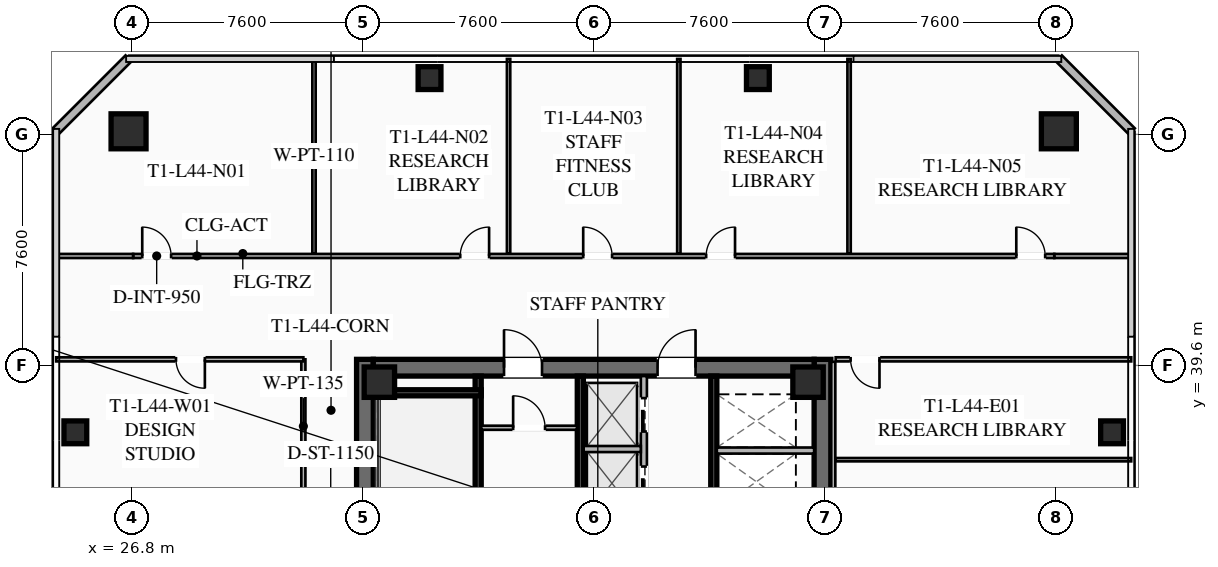
"""IFC4 building model, lengths in metres.
Left out: names, types, materials, properties, quantities, classifications, styles, units other than length and angle.
Written with IfcOpenShell. Run it as: python <this file> out.ifc"""

import sys

from ifc_helpers import new_model, si_unit, direction, frame, frame_2d, origin, origin_2d, place, context, subcontext, project, spatial, rectangle, hollow_rectangle, extrude, element, fill, save


model = new_model("IFC4")
c1 = context("Model", 3, precision=1e-05, world=origin(), true_north=direction((0.0, 1.0)))
c2 = subcontext(c1, "Body", "Model", "MODEL_VIEW")
j1 = project(units=[si_unit("LENGTHUNIT", "METRE"), si_unit("PLANEANGLEUNIT", "RADIAN")], contexts=[c1])
p1 = place(None, origin())
s1 = spatial("IfcSite", under=j1, at=p1, CompositionType="ELEMENT")
p2 = place(p1, origin())
s2 = spatial("IfcBuilding", under=s1, at=p2, CompositionType="ELEMENT")
p3 = place(p2, frame((0.0, 0.0, 164.1)))
s3 = spatial("IfcBuildingStorey", under=s2, at=p3, CompositionType="ELEMENT", Elevation=164.1)
for number, where, z_axis, x_axis in (
    (1, (34.475, 24.2, 0.0), (0.0, 0.0, 1.0), (0.0, 1.0, 0.0)),
    (2, (49.525, 39.8, 0.0), (0.0, 0.0, 1.0), (0.0, -1.0, 0.0)),
):
    element("IfcWall", number, at=place(p3, frame(where, z_axis=z_axis, x_axis=x_axis)), inside=s3, PredefinedType="SHEAR", context=c2, shape_type="SweptSolid", body=[
        extrude(rectangle(XDim=15.6, YDim=0.55, at=frame_2d((7.8, 0.0))), origin(), (0.0, 0.0, 1.0), 3.55),
    ])
p4 = place(p3, frame((34.75, 39.525, 0.0), z_axis=(0.0, 0.0, 1.0), x_axis=(1.0, 0.0, 0.0)))
e3 = element("IfcWall", 3, at=p4, inside=s3, PredefinedType="SHEAR", context=c2, shape_type="SweptSolid", body=[
    extrude(rectangle(XDim=14.5, YDim=0.55, at=frame_2d((7.25, 0.0))), origin(), (0.0, 0.0, 1.0), 3.55),
])
p5 = place(p4, frame((4.3, 0.0, 0.0)))
e4 = element("IfcOpeningElement", 4, at=p5, cuts=e3, PredefinedType="OPENING", context=c2, shape_type="SweptSolid", body=[
    extrude(rectangle(XDim=1.25, YDim=2.25, at=frame_2d((0.625, 1.125))), frame((0.0, 0.285, 0.0), z_axis=(0.0, -1.0, 0.0), x_axis=(1.0, 0.0, 0.0)), (0.0, 0.0, 1.0), 0.57),
])
p6 = place(p4, frame((9.35, 0.0, 0.0)))
e5 = element("IfcOpeningElement", 5, at=p6, cuts=e3, PredefinedType="OPENING", context=c2, shape_type="SweptSolid", body=[
    extrude(rectangle(XDim=1.25, YDim=2.25, at=frame_2d((0.625, 1.125))), frame((0.0, 0.285, 0.0), z_axis=(0.0, -1.0, 0.0), x_axis=(1.0, 0.0, 0.0)), (0.0, 0.0, 1.0), 0.57),
])
for number, where, z_axis, x_axis in (
    (6, (49.05, 39.05, 0.0), (0.0, 0.0, 1.0), (1.0, 0.0, 0.0)),
    (7, (34.95, 39.05, 0.0), (0.0, 0.0, 1.0), (1.0, 0.0, 0.0)),
):
    element("IfcColumn", number, at=place(p3, frame(where, z_axis=z_axis, x_axis=x_axis)), inside=s3, PredefinedType="COLUMN", context=c2, shape_type="SweptSolid", body=[
        extrude(hollow_rectangle(XDim=1.0, YDim=1.0, WallThickness=0.04, at=origin_2d()), origin(), (0.0, 0.0, 1.0), 3.37),
    ])
for number, where, z_axis, x_axis in (
    (8, (57.3, 47.3, 0.0), (0.0, 0.0, 1.0), (1.0, 0.0, 0.0)),
    (9, (26.7, 47.3, 0.0), (0.0, 0.0, 1.0), (1.0, 0.0, 0.0)),
):
    element("IfcColumn", number, at=place(p3, frame(where, z_axis=z_axis, x_axis=x_axis)), inside=s3, PredefinedType="COLUMN", context=c2, shape_type="SweptSolid", body=[
        extrude(hollow_rectangle(XDim=1.15, YDim=1.15, WallThickness=0.045, at=origin_2d()), origin(), (0.0, 0.0, 1.0), 3.37),
    ])
for number, where, z_axis, x_axis in (
    (10, (59.05, 37.4, 0.0), (0.0, 0.0, 1.0), (1.0, 0.0, 0.0)),
    (11, (47.4, 49.05, 0.0), (0.0, 0.0, 1.0), (1.0, 0.0, 0.0)),
    (12, (36.6, 49.05, 0.0), (0.0, 0.0, 1.0), (1.0, 0.0, 0.0)),
    (13, (24.95, 37.4, 0.0), (0.0, 0.0, 1.0), (1.0, 0.0, 0.0)),
):
    element("IfcColumn", number, at=place(p3, frame(where, z_axis=z_axis, x_axis=x_axis)), inside=s3, PredefinedType="COLUMN", context=c2, shape_type="SweptSolid", body=[
        extrude(hollow_rectangle(XDim=0.75, YDim=0.75, WallThickness=0.032, at=origin_2d()), origin(), (0.0, 0.0, 1.0), 3.37),
    ])
for number, where, z_axis, x_axis in (
    (14, (24.3, 47.3, 0.0), (0.0, 0.0, 1.0), (0.707, 0.707, 0.0)),
    (15, (57.3, 49.7, 0.0), (0.0, 0.0, 1.0), (0.707, -0.707, 0.0)),
):
    element("IfcWall", number, at=place(p3, frame(where, z_axis=z_axis, x_axis=x_axis)), inside=s3, PredefinedType="SOLIDWALL", context=c2, shape_type="SweptSolid", body=[
        extrude(rectangle(XDim=3.394, YDim=0.28, at=frame_2d((1.697, 0.0))), origin(), (0.0, 0.0, 1.0), 3.37),
    ])
p7 = place(p3, frame((38.2, 31.2, 0.0), z_axis=(0.0, 0.0, 1.0), x_axis=(0.0, 1.0, 0.0)))
e16 = element("IfcWall", 16, at=p7, inside=s3, PredefinedType="SHEAR", context=c2, shape_type="SweptSolid", body=[
    extrude(rectangle(XDim=8.05, YDim=0.2, at=frame_2d((4.025, 0.0))), origin(), (0.0, 0.0, 1.0), 3.37),
])
p8 = place(p7, frame((0.45, 0.0, 0.0)))
e17 = element("IfcOpeningElement", 17, at=p8, cuts=e16, PredefinedType="OPENING", context=c2, shape_type="SweptSolid", body=[
    extrude(rectangle(XDim=1.15, YDim=2.2, at=frame_2d((0.575, 1.1))), frame((0.0, 0.11, 0.0), z_axis=(0.0, -1.0, 0.0), x_axis=(1.0, 0.0, 0.0)), (0.0, 0.0, 1.0), 0.22),
])
p9 = place(p3, frame((34.75, 38.7, 0.0), z_axis=(0.0, 0.0, 1.0), x_axis=(1.0, 0.0, 0.0)))
e18 = element("IfcWall", 18, at=p9, inside=s3, PredefinedType="SHEAR", context=c2, shape_type="SweptSolid", body=[
    extrude(rectangle(XDim=3.55, YDim=0.2, at=frame_2d((1.775, 0.0))), origin(), (0.0, 0.0, 1.0), 3.37),
])
p10 = place(p3, frame((41.56, 24.75, 0.0), z_axis=(0.0, 0.0, 1.0), x_axis=(0.0, 1.0, 0.0)))
e19 = element("IfcWall", 19, at=p10, inside=s3, PredefinedType="SHEAR", context=c2, shape_type="SweptSolid", body=[
    extrude(rectangle(XDim=14.5, YDim=0.2, at=frame_2d((7.25, 0.0))), origin(), (0.0, 0.0, 1.0), 3.37),
])
p11 = place(p3, frame((45.95, 39.25, 0.0), z_axis=(0.0, 0.0, 1.0), x_axis=(0.0, -1.0, 0.0)))
e20 = element("IfcWall", 20, at=p11, inside=s3, PredefinedType="SHEAR", context=c2, shape_type="SweptSolid", body=[
    extrude(rectangle(XDim=6.45, YDim=0.2, at=frame_2d((3.225, 0.0))), origin(), (0.0, 0.0, 1.0), 3.37),
])
p12 = place(p3, frame((46.05, 36.8, 0.0), z_axis=(0.0, 0.0, 1.0), x_axis=(1.0, 0.0, 0.0)))
e21 = element("IfcWall", 21, at=p12, inside=s3, PredefinedType="SOLIDWALL", context=c2, shape_type="SweptSolid", body=[
    extrude(rectangle(XDim=3.2, YDim=0.2, at=frame_2d((1.6, 0.0))), origin(), (0.0, 0.0, 1.0), 3.37),
])
p13 = place(p3, frame((38.3, 37.55, 0.0), z_axis=(0.0, 0.0, 1.0), x_axis=(1.0, 0.0, 0.0)))
e22 = element("IfcWall", 22, at=p13, inside=s3, PredefinedType="PARTITIONING", context=c2, shape_type="SweptSolid", body=[
    extrude(rectangle(XDim=3.15, YDim=0.135, at=frame_2d((1.575, 0.0))), origin(), (0.0, 0.0, 1.0), 2.723),
])
p14 = place(p13, frame((1.05, 0.0, 0.0)))
e23 = element("IfcOpeningElement", 23, at=p14, cuts=e22, PredefinedType="OPENING", context=c2, shape_type="SweptSolid", body=[
    extrude(rectangle(XDim=1.05, YDim=2.2, at=frame_2d((0.525, 1.1))), frame((0.0, 0.077, 0.0), z_axis=(0.0, -1.0, 0.0), x_axis=(1.0, 0.0, 0.0)), (0.0, 0.0, 1.0), 0.155),
])
p15 = place(p3, frame((43.65, 32.35, 0.0), z_axis=(0.0, 0.0, 1.0), x_axis=(0.0, 1.0, 0.0)))
e24 = element("IfcWall", 24, at=p15, inside=s3, PredefinedType="SOLIDWALL", context=c2, shape_type="SweptSolid", body=[
    extrude(rectangle(XDim=6.9, YDim=0.2, at=frame_2d((3.45, 0.0))), origin(), (0.0, 0.0, 1.0), 3.37),
])
p16 = place(p15, frame((0.575, 0.0, 0.0)))
e25 = element("IfcOpeningElement", 25, at=p16, cuts=e24, PredefinedType="OPENING", context=c2, shape_type="SweptSolid", body=[
    extrude(rectangle(XDim=1.1, YDim=2.2, at=frame_2d((0.55, 1.1))), frame((0.0, 0.11, 0.0), z_axis=(0.0, -1.0, 0.0), x_axis=(1.0, 0.0, 0.0)), (0.0, 0.0, 1.0), 0.22),
])
p17 = place(p15, frame((2.825, 0.0, 0.0)))
e26 = element("IfcOpeningElement", 26, at=p17, cuts=e24, PredefinedType="OPENING", context=c2, shape_type="SweptSolid", body=[
    extrude(rectangle(XDim=1.1, YDim=2.2, at=frame_2d((0.55, 1.1))), frame((0.0, 0.11, 0.0), z_axis=(0.0, -1.0, 0.0), x_axis=(1.0, 0.0, 0.0)), (0.0, 0.0, 1.0), 0.22),
])
p18 = place(p15, frame((5.075, 0.0, 0.0)))
e27 = element("IfcOpeningElement", 27, at=p18, cuts=e24, PredefinedType="OPENING", context=c2, shape_type="SweptSolid", body=[
    extrude(rectangle(XDim=1.1, YDim=2.2, at=frame_2d((0.55, 1.1))), frame((0.0, 0.11, 0.0), z_axis=(0.0, -1.0, 0.0), x_axis=(1.0, 0.0, 0.0)), (0.0, 0.0, 1.0), 0.22),
])
p19 = place(p3, frame((41.67, 36.85, 0.0), z_axis=(0.0, 0.0, 1.0), x_axis=(1.0, 0.0, 0.0)))
e28 = element("IfcWall", 28, at=p19, inside=s3, PredefinedType="SOLIDWALL", context=c2, shape_type="SweptSolid", body=[
    extrude(rectangle(XDim=1.88, YDim=0.2, at=frame_2d((0.94, 0.0))), origin(), (0.0, 0.0, 1.0), 3.37),
])
p20 = place(p3, frame((32.45, 35.4, 0.0), z_axis=(0.0, 0.0, 1.0), x_axis=(0.0, 1.0, 0.0)))
e29 = element("IfcWall", 29, at=p20, inside=s3, PredefinedType="PARTITIONING", context=c2, shape_type="SweptSolid", body=[
    extrude(rectangle(XDim=4.4, YDim=0.135, at=frame_2d((2.2, 0.0))), origin(), (0.0, 0.0, 1.0), 2.723),
])
p21 = place(p3, frame((26.85, 43.2, 0.0), z_axis=(0.0, 0.0, 1.0), x_axis=(1.0, 0.0, 0.0)))
e30 = element("IfcWall", 30, at=p21, inside=s3, PredefinedType="PARTITIONING", context=c2, shape_type="SweptSolid", body=[
    extrude(rectangle(XDim=30.3, YDim=0.135, at=frame_2d((15.15, 0.0))), origin(), (0.0, 0.0, 1.0), 2.723),
])
p22 = place(p21, frame((0.3, 0.0, 0.0)))
e31 = element("IfcOpeningElement", 31, at=p22, cuts=e30, PredefinedType="OPENING", context=c2, shape_type="SweptSolid", body=[
    extrude(rectangle(XDim=0.95, YDim=2.05, at=frame_2d((0.475, 1.025))), frame((0.0, 0.077, 0.0), z_axis=(0.0, -1.0, 0.0), x_axis=(1.0, 0.0, 0.0)), (0.0, 0.0, 1.0), 0.155),
])
p23 = place(p21, frame((10.76, 0.0, 0.0)))
e32 = element("IfcOpeningElement", 32, at=p23, cuts=e30, PredefinedType="OPENING", context=c2, shape_type="SweptSolid", body=[
    extrude(rectangle(XDim=0.95, YDim=2.05, at=frame_2d((0.475, 1.025))), frame((0.0, 0.077, 0.0), z_axis=(0.0, -1.0, 0.0), x_axis=(1.0, 0.0, 0.0)), (0.0, 0.0, 1.0), 0.155),
])
p24 = place(p21, frame((14.805, 0.0, 0.0)))
e33 = element("IfcOpeningElement", 33, at=p24, cuts=e30, PredefinedType="OPENING", context=c2, shape_type="SweptSolid", body=[
    extrude(rectangle(XDim=0.95, YDim=2.05, at=frame_2d((0.475, 1.025))), frame((0.0, 0.077, 0.0), z_axis=(0.0, -1.0, 0.0), x_axis=(1.0, 0.0, 0.0)), (0.0, 0.0, 1.0), 0.155),
])
p25 = place(p21, frame((18.849, 0.0, 0.0)))
e34 = element("IfcOpeningElement", 34, at=p25, cuts=e30, PredefinedType="OPENING", context=c2, shape_type="SweptSolid", body=[
    extrude(rectangle(XDim=0.95, YDim=2.05, at=frame_2d((0.475, 1.025))), frame((0.0, 0.077, 0.0), z_axis=(0.0, -1.0, 0.0), x_axis=(1.0, 0.0, 0.0)), (0.0, 0.0, 1.0), 0.155),
])
p26 = place(p21, frame((29.05, 0.0, 0.0)))
e35 = element("IfcOpeningElement", 35, at=p26, cuts=e30, PredefinedType="OPENING", context=c2, shape_type="SweptSolid", body=[
    extrude(rectangle(XDim=0.95, YDim=2.05, at=frame_2d((0.475, 1.025))), frame((0.0, 0.077, 0.0), z_axis=(0.0, -1.0, 0.0), x_axis=(1.0, 0.0, 0.0)), (0.0, 0.0, 1.0), 0.155),
])
for number, where, z_axis, x_axis in (
    (36, (24.32, 43.2, 0.0), (0.0, 0.0, 1.0), (1.0, 0.0, 0.0)),
    (37, (57.15, 43.2, 0.0), (0.0, 0.0, 1.0), (1.0, 0.0, 0.0)),
):
    element("IfcWall", number, at=place(p3, frame(where, z_axis=z_axis, x_axis=x_axis)), inside=s3, PredefinedType="PARTITIONING", context=c2, shape_type="SweptSolid", body=[
        extrude(rectangle(XDim=2.53, YDim=0.135, at=frame_2d((1.265, 0.0))), origin(), (0.0, 0.0, 1.0), 2.723),
    ])
for number, where, z_axis, x_axis in (
    (38, (32.8, 43.28, 0.0), (0.0, 0.0, 1.0), (0.0, 1.0, 0.0)),
    (39, (39.2, 43.28, 0.0), (0.0, 0.0, 1.0), (0.0, 1.0, 0.0)),
    (40, (44.8, 43.28, 0.0), (0.0, 0.0, 1.0), (0.0, 1.0, 0.0)),
    (41, (50.4, 43.28, 0.0), (0.0, 0.0, 1.0), (0.0, 1.0, 0.0)),
):
    element("IfcWall", number, at=place(p3, frame(where, z_axis=z_axis, x_axis=x_axis)), inside=s3, PredefinedType="PARTITIONING", context=c2, shape_type="SweptSolid", body=[
        extrude(rectangle(XDim=6.4, YDim=0.11, at=frame_2d((3.2, 0.0))), origin(), (0.0, 0.0, 1.0), 2.723),
    ])
p27 = place(p3, frame((49.88, 39.72, 0.0), z_axis=(0.0, 0.0, 1.0), x_axis=(0.0, -1.0, 0.0)))
e42 = element("IfcWall", 42, at=p27, inside=s3, PredefinedType="PARTITIONING", context=c2, shape_type="SweptSolid", body=[
    extrude(rectangle(XDim=15.44, YDim=0.135, at=frame_2d((7.72, 0.0))), origin(), (0.0, 0.0, 1.0), 2.723),
])
p28 = place(p3, frame((59.68, 39.8, 0.0), z_axis=(0.0, 0.0, 1.0), x_axis=(-1.0, 0.0, 0.0)))
e43 = element("IfcWall", 43, at=p28, inside=s3, PredefinedType="PARTITIONING", context=c2, shape_type="SweptSolid", body=[
    extrude(rectangle(XDim=9.72, YDim=0.135, at=frame_2d((4.86, 0.0))), origin(), (0.0, 0.0, 1.0), 2.723),
])
p29 = place(p28, frame((8.28, 0.0, 0.0)))
e44 = element("IfcOpeningElement", 44, at=p29, cuts=e43, PredefinedType="OPENING", context=c2, shape_type="SweptSolid", body=[
    extrude(rectangle(XDim=0.95, YDim=2.05, at=frame_2d((0.475, 1.025))), frame((0.0, 0.077, 0.0), z_axis=(0.0, -1.0, 0.0), x_axis=(1.0, 0.0, 0.0)), (0.0, 0.0, 1.0), 0.155),
])
p30 = place(p3, frame((49.96, 36.5, 0.0), z_axis=(0.0, 0.0, 1.0), x_axis=(1.0, 0.0, 0.0)))
e45 = element("IfcWall", 45, at=p30, inside=s3, PredefinedType="PARTITIONING", context=c2, shape_type="SweptSolid", body=[
    extrude(rectangle(XDim=9.72, YDim=0.11, at=frame_2d((4.86, 0.0))), origin(), (0.0, 0.0, 1.0), 2.723),
])
p31 = place(p3, frame((32.45, 39.8, 0.0), z_axis=(0.0, 0.0, 1.0), x_axis=(-1.0, 0.0, 0.0)))
e46 = element("IfcWall", 46, at=p31, inside=s3, PredefinedType="PARTITIONING", context=c2, shape_type="SweptSolid", body=[
    extrude(rectangle(XDim=8.13, YDim=0.135, at=frame_2d((4.065, 0.0))), origin(), (0.0, 0.0, 1.0), 2.723),
])
p32 = place(p31, frame((3.24, 0.0, 0.0)))
e47 = element("IfcOpeningElement", 47, at=p32, cuts=e46, PredefinedType="OPENING", context=c2, shape_type="SweptSolid", body=[
    extrude(rectangle(XDim=0.95, YDim=2.05, at=frame_2d((0.475, 1.025))), frame((0.0, 0.077, 0.0), z_axis=(0.0, -1.0, 0.0), x_axis=(1.0, 0.0, 0.0)), (0.0, 0.0, 1.0), 0.155),
])
p33 = place(p5, origin())
e48 = element("IfcDoor", 48, at=p33, inside=s3, OperationType="SINGLE_SWING_LEFT", PredefinedType="DOOR", context=c2, shape_type="SweptSolid", body=[
    extrude(rectangle(XDim=1.25, YDim=2.25, at=frame_2d((0.625, 1.125))), frame((0.0, 0.025, 0.0), z_axis=(0.0, -1.0, 0.0), x_axis=(1.0, 0.0, 0.0)), (0.0, 0.0, 1.0), 0.05),
])
fill(e4, e48)
p34 = place(p6, origin())
e49 = element("IfcDoor", 49, at=p34, inside=s3, OperationType="SINGLE_SWING_RIGHT", PredefinedType="DOOR", context=c2, shape_type="SweptSolid", body=[
    extrude(rectangle(XDim=1.25, YDim=2.25, at=frame_2d((0.625, 1.125))), frame((0.0, 0.025, 0.0), z_axis=(0.0, -1.0, 0.0), x_axis=(1.0, 0.0, 0.0)), (0.0, 0.0, 1.0), 0.05),
])
fill(e5, e49)
p35 = place(p14, origin())
e50 = element("IfcDoor", 50, at=p35, inside=s3, OperationType="SINGLE_SWING_LEFT", PredefinedType="DOOR", context=c2, shape_type="SweptSolid", body=[
    extrude(rectangle(XDim=1.05, YDim=2.2, at=frame_2d((0.525, 1.1))), frame((0.0, 0.025, 0.0), z_axis=(0.0, -1.0, 0.0), x_axis=(1.0, 0.0, 0.0)), (0.0, 0.0, 1.0), 0.05),
])
fill(e23, e50)
p36 = place(p22, origin())
e51 = element("IfcDoor", 51, at=p36, inside=s3, OperationType="SINGLE_SWING_LEFT", PredefinedType="DOOR", context=c2, shape_type="SweptSolid", body=[
    extrude(rectangle(XDim=0.95, YDim=2.05, at=frame_2d((0.475, 1.025))), frame((0.0, 0.025, 0.0), z_axis=(0.0, -1.0, 0.0), x_axis=(1.0, 0.0, 0.0)), (0.0, 0.0, 1.0), 0.05),
])
fill(e31, e51)
p37 = place(p23, origin())
e52 = element("IfcDoor", 52, at=p37, inside=s3, OperationType="SINGLE_SWING_RIGHT", PredefinedType="DOOR", context=c2, shape_type="SweptSolid", body=[
    extrude(rectangle(XDim=0.95, YDim=2.05, at=frame_2d((0.475, 1.025))), frame((0.0, 0.025, 0.0), z_axis=(0.0, -1.0, 0.0), x_axis=(1.0, 0.0, 0.0)), (0.0, 0.0, 1.0), 0.05),
])
fill(e32, e52)
p38 = place(p24, origin())
e53 = element("IfcDoor", 53, at=p38, inside=s3, OperationType="SINGLE_SWING_LEFT", PredefinedType="DOOR", context=c2, shape_type="SweptSolid", body=[
    extrude(rectangle(XDim=0.95, YDim=2.05, at=frame_2d((0.475, 1.025))), frame((0.0, 0.025, 0.0), z_axis=(0.0, -1.0, 0.0), x_axis=(1.0, 0.0, 0.0)), (0.0, 0.0, 1.0), 0.05),
])
fill(e33, e53)
p39 = place(p25, origin())
e54 = element("IfcDoor", 54, at=p39, inside=s3, OperationType="SINGLE_SWING_RIGHT", PredefinedType="DOOR", context=c2, shape_type="SweptSolid", body=[
    extrude(rectangle(XDim=0.95, YDim=2.05, at=frame_2d((0.475, 1.025))), frame((0.0, 0.025, 0.0), z_axis=(0.0, -1.0, 0.0), x_axis=(1.0, 0.0, 0.0)), (0.0, 0.0, 1.0), 0.05),
])
fill(e34, e54)
p40 = place(p26, origin())
e55 = element("IfcDoor", 55, at=p40, inside=s3, OperationType="SINGLE_SWING_LEFT", PredefinedType="DOOR", context=c2, shape_type="SweptSolid", body=[
    extrude(rectangle(XDim=0.95, YDim=2.05, at=frame_2d((0.475, 1.025))), frame((0.0, 0.025, 0.0), z_axis=(0.0, -1.0, 0.0), x_axis=(1.0, 0.0, 0.0)), (0.0, 0.0, 1.0), 0.05),
])
fill(e35, e55)
p41 = place(p29, origin())
e56 = element("IfcDoor", 56, at=p41, inside=s3, OperationType="SINGLE_SWING_LEFT", PredefinedType="DOOR", context=c2, shape_type="SweptSolid", body=[
    extrude(rectangle(XDim=0.95, YDim=2.05, at=frame_2d((0.475, 1.025))), frame((0.0, 0.025, 0.0), z_axis=(0.0, -1.0, 0.0), x_axis=(1.0, 0.0, 0.0)), (0.0, 0.0, 1.0), 0.05),
])
fill(e44, e56)
p42 = place(p32, origin())
e57 = element("IfcDoor", 57, at=p42, inside=s3, OperationType="SINGLE_SWING_LEFT", PredefinedType="DOOR", context=c2, shape_type="SweptSolid", body=[
    extrude(rectangle(XDim=0.95, YDim=2.05, at=frame_2d((0.475, 1.025))), frame((0.0, 0.025, 0.0), z_axis=(0.0, -1.0, 0.0), x_axis=(1.0, 0.0, 0.0)), (0.0, 0.0, 1.0), 0.05),
])
fill(e47, e57)
p43 = place(p17, origin())
e58 = element("IfcDoor", 58, at=p43, inside=s3, OperationType="SLIDING_TO_LEFT", PredefinedType="DOOR", context=c2, shape_type="SweptSolid", body=[
    extrude(rectangle(XDim=1.1, YDim=2.2, at=frame_2d((0.55, 1.1))), frame((0.0, 0.025, 0.0), z_axis=(0.0, -1.0, 0.0), x_axis=(1.0, 0.0, 0.0)), (0.0, 0.0, 1.0), 0.05),
])
fill(e26, e58)
p44 = place(p18, origin())
e59 = element("IfcDoor", 59, at=p44, inside=s3, OperationType="SLIDING_TO_LEFT", PredefinedType="DOOR", context=c2, shape_type="SweptSolid", body=[
    extrude(rectangle(XDim=1.1, YDim=2.2, at=frame_2d((0.55, 1.1))), frame((0.0, 0.025, 0.0), z_axis=(0.0, -1.0, 0.0), x_axis=(1.0, 0.0, 0.0)), (0.0, 0.0, 1.0), 0.05),
])
fill(e27, e59)
save(model, sys.argv[1])
